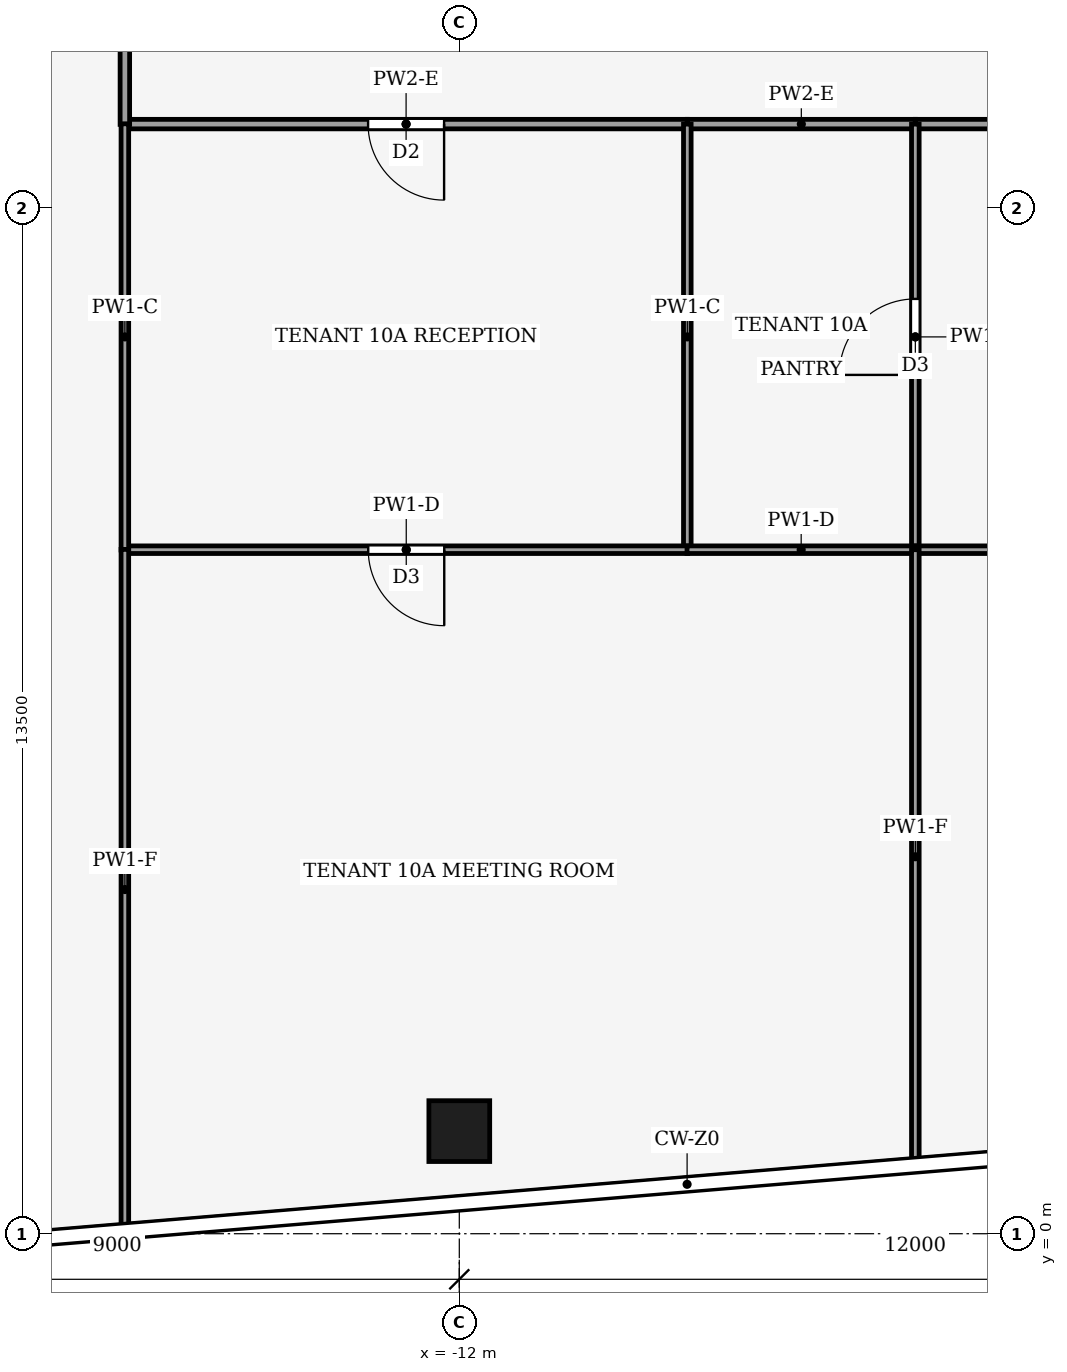
"""IFC4 building model, lengths in metres.
Left out: names, types, materials, properties, quantities, classifications, styles, units other than length and angle.
Written with IfcOpenShell. Run it as: python <this file> out.ifc"""

import sys

from ifc_helpers import new_model, si_unit, direction, frame, frame_2d, origin, origin_2d, place, context, subcontext, project, spatial, rectangle, hollow_rectangle, extrude, element, fill, save


model = new_model("IFC4")
c1 = context("Model", 3, precision=1e-05, world=origin(), true_north=direction((0.0, 1.0)))
c2 = subcontext(c1, "Body", "Model", "MODEL_VIEW")
j1 = project(units=[si_unit("LENGTHUNIT", "METRE"), si_unit("PLANEANGLEUNIT", "RADIAN")], contexts=[c1])
p1 = place(None, origin())
s1 = spatial("IfcSite", under=j1, at=p1, CompositionType="ELEMENT")
p2 = place(p1, origin())
s2 = spatial("IfcBuilding", under=s1, at=p2, CompositionType="ELEMENT")
p3 = place(p2, frame((0.0, 0.0, 46.0)))
s3 = spatial("IfcBuildingStorey", under=s2, at=p3, CompositionType="ELEMENT", Elevation=46.0)
p4 = place(p3, frame((-12.0, 1.35, 0.0), z_axis=(0.0, 0.0, 1.0), x_axis=(1.0, 0.0, 0.0)))
e1 = element("IfcColumn", 1, at=p4, inside=s3, PredefinedType="COLUMN", context=c2, shape_type="SweptSolid", body=[
    extrude(hollow_rectangle(XDim=0.8, YDim=0.8, WallThickness=0.04, at=origin_2d()), origin(), (0.0, 0.0, 1.0), 4.0),
])
p5 = place(p3, frame((-9.0, 14.6, 0.0), z_axis=(0.0, 0.0, 1.0), x_axis=(-1.0, 0.0, 0.0)))
e2 = element("IfcWall", 2, at=p5, inside=s3, PredefinedType="PARTITIONING", context=c2, shape_type="SweptSolid", body=[
    extrude(rectangle(XDim=7.4, YDim=0.125, at=frame_2d((3.7, 0.0))), origin(), (0.0, 0.0, 1.0), 3.29),
])
p6 = place(p5, frame((3.2, 0.0, 0.0)))
e3 = element("IfcOpeningElement", 3, at=p6, cuts=e2, PredefinedType="OPENING", context=c2, shape_type="SweptSolid", body=[
    extrude(rectangle(XDim=1.0, YDim=2.1, at=frame_2d((0.5, 1.05))), frame((0.0, 0.073, 0.0), z_axis=(0.0, -1.0, 0.0), x_axis=(1.0, 0.0, 0.0)), (0.0, 0.0, 1.0), 0.145),
])
p7 = place(p3, frame((-9.0, 14.6, 0.0), z_axis=(0.0, 0.0, 1.0), x_axis=(1.0, 0.0, 0.0)))
e4 = element("IfcWall", 4, at=p7, inside=s3, PredefinedType="PARTITIONING", context=c2, shape_type="SweptSolid", body=[
    extrude(rectangle(XDim=3.0, YDim=0.125, at=frame_2d((1.5, 0.0))), origin(), (0.0, 0.0, 1.0), 3.29),
])
p8 = place(p3, frame((3.0, 14.6, 0.0), z_axis=(0.0, 0.0, 1.0), x_axis=(-1.0, 0.0, 0.0)))
e5 = element("IfcWall", 5, at=p8, inside=s3, PredefinedType="PARTITIONING", context=c2, shape_type="SweptSolid", body=[
    extrude(rectangle(XDim=9.0, YDim=0.125, at=frame_2d((4.5, 0.0))), origin(), (0.0, 0.0, 1.0), 3.29),
])
p9 = place(p8, frame((4.0, 0.0, 0.0)))
e6 = element("IfcOpeningElement", 6, at=p9, cuts=e5, PredefinedType="OPENING", context=c2, shape_type="SweptSolid", body=[
    extrude(rectangle(XDim=1.0, YDim=2.1, at=frame_2d((0.5, 1.05))), frame((0.0, 0.073, 0.0), z_axis=(0.0, -1.0, 0.0), x_axis=(1.0, 0.0, 0.0)), (0.0, 0.0, 1.0), 0.145),
])
p10 = place(p3, frame((-16.4, 14.596, 0.0), z_axis=(0.0, 0.0, 1.0), x_axis=(0.0, 1.0, 0.0)))
e7 = element("IfcWall", 7, at=p10, inside=s3, PredefinedType="PARTITIONING", context=c2, shape_type="SweptSolid", body=[
    extrude(rectangle(XDim=9.404, YDim=0.125, at=frame_2d((4.702, 0.0))), origin(), (0.0, 0.0, 1.0), 3.14),
])
p11 = place(p10, frame((4.202, 0.0, 0.0)))
e8 = element("IfcOpeningElement", 8, at=p11, cuts=e7, PredefinedType="OPENING", context=c2, shape_type="SweptSolid", body=[
    extrude(rectangle(XDim=1.0, YDim=2.1, at=frame_2d((0.5, 1.05))), frame((0.0, 0.073, 0.0), z_axis=(0.0, -1.0, 0.0), x_axis=(1.0, 0.0, 0.0)), (0.0, 0.0, 1.0), 0.145),
])
p12 = place(p3, frame((-9.0, 9.0, 0.0), z_axis=(0.0, 0.0, 1.0), x_axis=(0.0, 1.0, 0.0)))
e9 = element("IfcWall", 9, at=p12, inside=s3, PredefinedType="PARTITIONING", context=c2, shape_type="SweptSolid", body=[
    extrude(rectangle(XDim=5.6, YDim=0.1, at=frame_2d((2.8, 0.0))), origin(), (0.0, 0.0, 1.0), 3.87),
])
p13 = place(p3, frame((-8.996, 9.0, 0.0), z_axis=(0.0, 0.0, 1.0), x_axis=(-1.0, 0.0, 0.0)))
e10 = element("IfcWall", 10, at=p13, inside=s3, PredefinedType="PARTITIONING", context=c2, shape_type="SweptSolid", body=[
    extrude(rectangle(XDim=7.404, YDim=0.1, at=frame_2d((3.702, 0.0))), origin(), (0.0, 0.0, 1.0), 3.29),
])
p14 = place(p13, frame((3.202, 0.0, 0.0)))
e11 = element("IfcOpeningElement", 11, at=p14, cuts=e10, PredefinedType="OPENING", context=c2, shape_type="SweptSolid", body=[
    extrude(rectangle(XDim=1.0, YDim=2.1, at=frame_2d((0.5, 1.05))), frame((0.0, 0.06, 0.0), z_axis=(0.0, -1.0, 0.0), x_axis=(1.0, 0.0, 0.0)), (0.0, 0.0, 1.0), 0.12),
])
p15 = place(p3, frame((-16.4, 14.604, 0.0), z_axis=(0.0, 0.0, 1.0), x_axis=(0.0, -1.0, 0.0)))
e12 = element("IfcWall", 12, at=p15, inside=s3, PredefinedType="PARTITIONING", context=c2, shape_type="SweptSolid", body=[
    extrude(rectangle(XDim=5.608, YDim=0.1, at=frame_2d((2.804, 0.0))), origin(), (0.0, 0.0, 1.0), 3.87),
])
p16 = place(p3, frame((-6.0, 9.0, 0.0), z_axis=(0.0, 0.0, 1.0), x_axis=(0.0, 1.0, 0.0)))
e13 = element("IfcWall", 13, at=p16, inside=s3, PredefinedType="PARTITIONING", context=c2, shape_type="SweptSolid", body=[
    extrude(rectangle(XDim=5.6, YDim=0.1, at=frame_2d((2.8, 0.0))), origin(), (0.0, 0.0, 1.0), 3.87),
])
p17 = place(p16, frame((2.3, 0.0, 0.0)))
e14 = element("IfcOpeningElement", 14, at=p17, cuts=e13, PredefinedType="OPENING", context=c2, shape_type="SweptSolid", body=[
    extrude(rectangle(XDim=1.0, YDim=2.1, at=frame_2d((0.5, 1.05))), frame((0.0, 0.06, 0.0), z_axis=(0.0, -1.0, 0.0), x_axis=(1.0, 0.0, 0.0)), (0.0, 0.0, 1.0), 0.12),
])
p18 = place(p3, frame((-9.004, 9.0, 0.0), z_axis=(0.0, 0.0, 1.0), x_axis=(1.0, 0.0, 0.0)))
e15 = element("IfcWall", 15, at=p18, inside=s3, PredefinedType="PARTITIONING", context=c2, shape_type="SweptSolid", body=[
    extrude(rectangle(XDim=3.004, YDim=0.1, at=frame_2d((1.502, 0.0))), origin(), (0.0, 0.0, 1.0), 3.29),
])
p19 = place(p3, frame((3.0, 9.0, 0.0), z_axis=(0.0, 0.0, 1.0), x_axis=(-1.0, 0.0, 0.0)))
e16 = element("IfcWall", 16, at=p19, inside=s3, PredefinedType="PARTITIONING", context=c2, shape_type="SweptSolid", body=[
    extrude(rectangle(XDim=9.0, YDim=0.1, at=frame_2d((4.5, 0.0))), origin(), (0.0, 0.0, 1.0), 3.29),
])
p20 = place(p19, frame((4.0, 0.0, 0.0)))
e17 = element("IfcOpeningElement", 17, at=p20, cuts=e16, PredefinedType="OPENING", context=c2, shape_type="SweptSolid", body=[
    extrude(rectangle(XDim=1.0, YDim=2.1, at=frame_2d((0.5, 1.05))), frame((0.0, 0.06, 0.0), z_axis=(0.0, -1.0, 0.0), x_axis=(1.0, 0.0, 0.0)), (0.0, 0.0, 1.0), 0.12),
])
p21 = place(p3, frame((-6.0, 0.92, 0.0), z_axis=(0.0, 0.0, 1.0), x_axis=(0.0, 1.0, 0.0)))
e18 = element("IfcWall", 18, at=p21, inside=s3, PredefinedType="PARTITIONING", context=c2, shape_type="SweptSolid", body=[
    extrude(rectangle(XDim=8.08, YDim=0.1, at=frame_2d((4.04, 0.0))), origin(), (0.0, 0.0, 1.0), 3.04),
])
p22 = place(p3, frame((-16.4, 9.004, 0.0), z_axis=(0.0, 0.0, 1.0), x_axis=(0.0, -1.0, 0.0)))
e19 = element("IfcWall", 19, at=p22, inside=s3, PredefinedType="PARTITIONING", context=c2, shape_type="SweptSolid", body=[
    extrude(rectangle(XDim=8.951, YDim=0.1, at=frame_2d((4.475, 0.0))), origin(), (0.0, 0.0, 1.0), 3.04),
])
p23 = place(p6, origin())
e20 = element("IfcDoor", 20, at=p23, inside=s3, OperationType="SINGLE_SWING_LEFT", PredefinedType="DOOR", context=c2, shape_type="SweptSolid", body=[
    extrude(rectangle(XDim=1.0, YDim=2.1, at=frame_2d((0.5, 1.05))), frame((0.0, 0.025, 0.0), z_axis=(0.0, -1.0, 0.0), x_axis=(1.0, 0.0, 0.0)), (0.0, 0.0, 1.0), 0.05),
])
fill(e3, e20)
p24 = place(p14, origin())
e21 = element("IfcDoor", 21, at=p24, inside=s3, OperationType="SINGLE_SWING_LEFT", PredefinedType="DOOR", context=c2, shape_type="SweptSolid", body=[
    extrude(rectangle(XDim=1.0, YDim=2.1, at=frame_2d((0.5, 1.05))), frame((0.0, 0.025, 0.0), z_axis=(0.0, -1.0, 0.0), x_axis=(1.0, 0.0, 0.0)), (0.0, 0.0, 1.0), 0.05),
])
fill(e11, e21)
p25 = place(p17, origin())
e22 = element("IfcDoor", 22, at=p25, inside=s3, OperationType="SINGLE_SWING_RIGHT", PredefinedType="DOOR", context=c2, shape_type="SweptSolid", body=[
    extrude(rectangle(XDim=1.0, YDim=2.1, at=frame_2d((0.5, 1.05))), frame((0.0, 0.025, 0.0), z_axis=(0.0, -1.0, 0.0), x_axis=(1.0, 0.0, 0.0)), (0.0, 0.0, 1.0), 0.05),
])
fill(e14, e22)
save(model, sys.argv[1])
